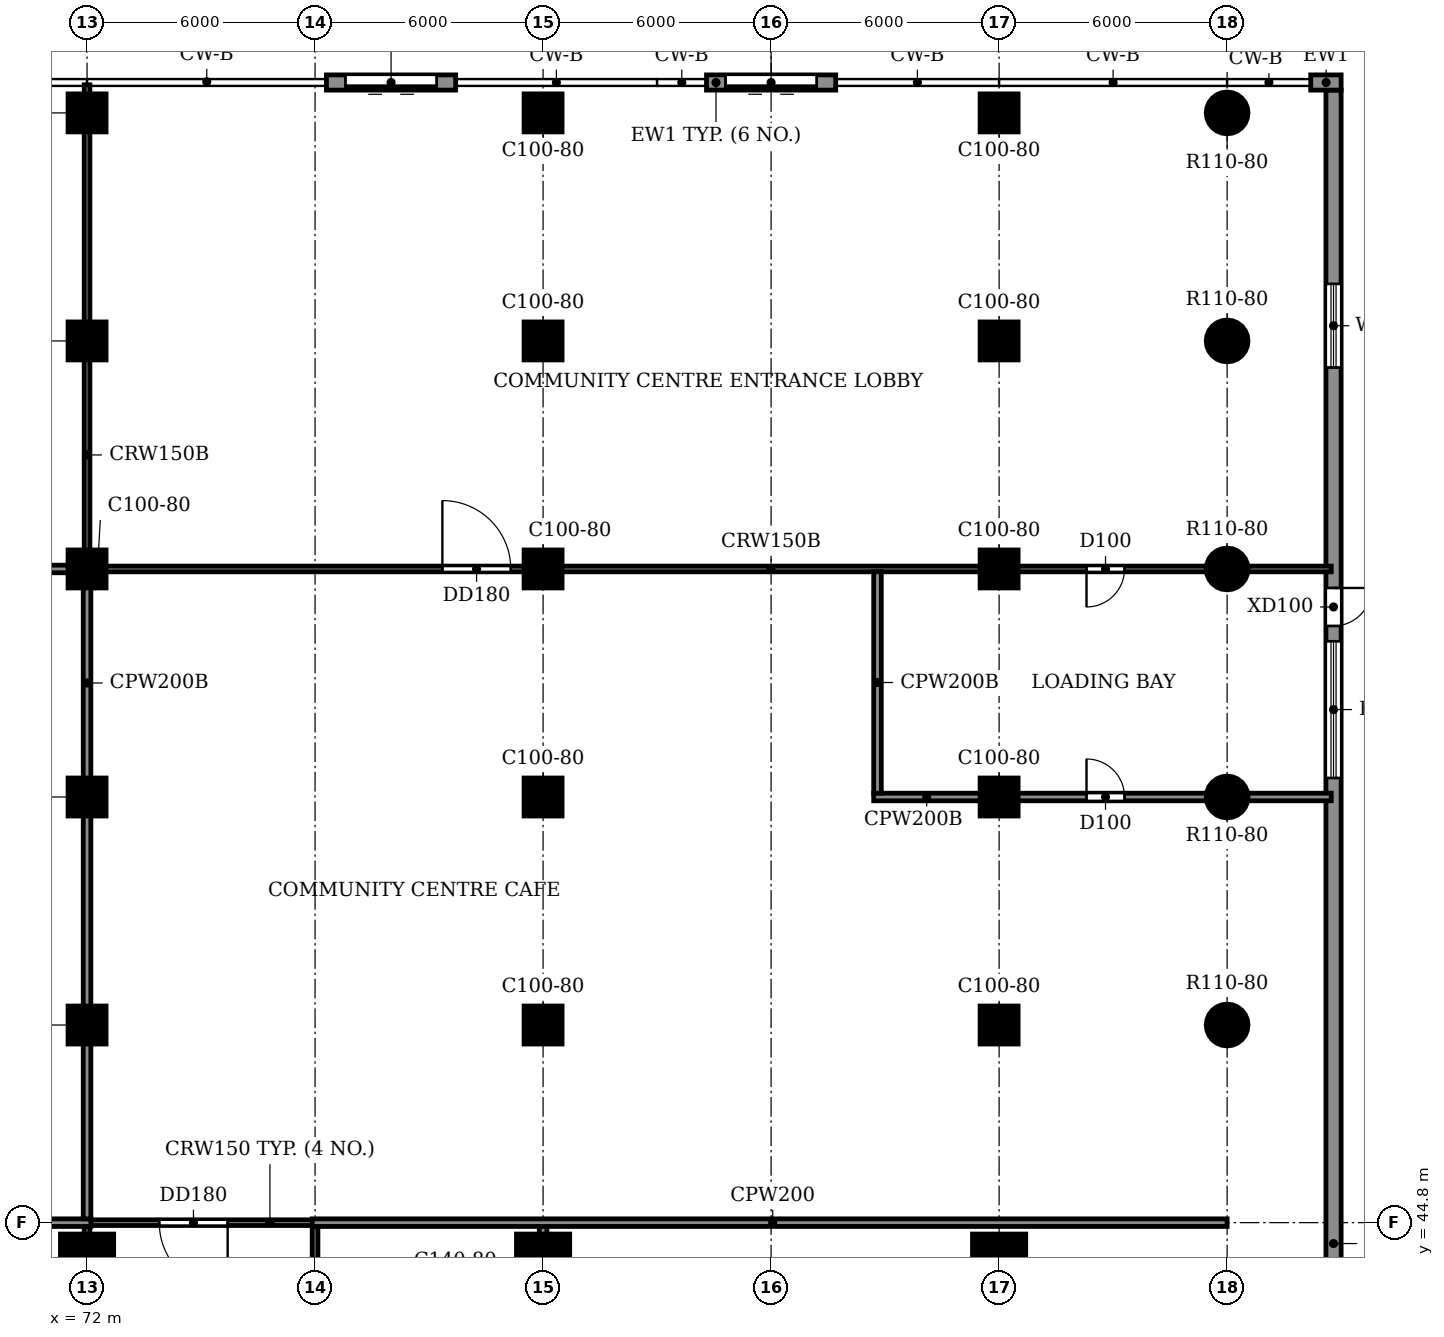
"""IFC4 building model, lengths in metres.
Left out: names, types, materials, properties, quantities, classifications, styles, units other than length and angle.
Written with IfcOpenShell. Run it as: python <this file> out.ifc"""

import sys

from ifc_helpers import new_model, si_unit, direction, frame, frame_2d, origin, origin_2d, place, context, subcontext, project, spatial, rectangle, circle, extrude, source, transform, mapped, element, fill, save


model = new_model("IFC4")
c1 = context("Model", 3, precision=1e-05, world=origin(), true_north=direction((0.0, 1.0)))
c2 = subcontext(c1, "Body", "Model", "MODEL_VIEW")
j1 = project(units=[si_unit("LENGTHUNIT", "METRE"), si_unit("PLANEANGLEUNIT", "RADIAN")], contexts=[c1])
p1 = place(None, origin())
s1 = spatial("IfcSite", under=j1, at=p1, CompositionType="ELEMENT")
p2 = place(p1, origin())
s2 = spatial("IfcBuilding", under=s1, at=p2, CompositionType="ELEMENT")
p3 = place(p2, origin())
s3 = spatial("IfcBuildingStorey", under=s2, at=p3, CompositionType="ELEMENT", Elevation=0.0)
m1 = source(origin(), c2, "Body", "SweptSolid", [
    extrude(rectangle(XDim=1.4, YDim=1.4, at=origin_2d()), origin(), (0.0, 0.0, 1.0), 4.5),
])
for number, where, z_axis, x_axis in (
    (1, (72.0, 43.8, -0.3), (0.0, 0.0, 1.0), (1.0, 0.0, 0.0)),
    (2, (84.0, 43.8, -0.3), (0.0, 0.0, 1.0), (1.0, 0.0, 0.0)),
    (3, (96.0, 43.8, -0.3), (0.0, 0.0, 1.0), (1.0, 0.0, 0.0)),
):
    element("IfcColumn", number, at=place(p3, frame(where, z_axis=z_axis, x_axis=x_axis)), inside=s3, PredefinedType="COLUMN", context=c2, shape_type="MappedRepresentation", body=[
        mapped(m1, transform((0.0, 0.0, 0.0))),
    ])
m2 = source(origin(), c2, "Body", "SweptSolid", [
    extrude(rectangle(XDim=1.0, YDim=1.0, at=origin_2d()), origin(), (0.0, 0.0, 1.0), 5.98),
])
for number, where, z_axis, x_axis in (
    (4, (72.0, 74.0, -0.3), (0.0, 0.0, 1.0), (1.0, 0.0, 0.0)),
    (5, (84.0, 74.0, -0.3), (0.0, 0.0, 1.0), (1.0, 0.0, 0.0)),
    (6, (96.0, 74.0, -0.3), (0.0, 0.0, 1.0), (1.0, 0.0, 0.0)),
):
    element("IfcColumn", number, at=place(p3, frame(where, z_axis=z_axis, x_axis=x_axis)), inside=s3, PredefinedType="COLUMN", context=c2, shape_type="MappedRepresentation", body=[
        mapped(m2, transform((0.0, 0.0, 0.0))),
    ])
m3 = source(origin(), c2, "Body", "SweptSolid", [
    extrude(circle(Radius=0.55, at=origin_2d()), origin(), (0.0, 0.0, 1.0), 5.98),
])
p4 = place(p3, frame((102.0, 74.0, -0.3), z_axis=(0.0, 0.0, 1.0), x_axis=(1.0, 0.0, 0.0)))
e7 = element("IfcColumn", 7, at=p4, inside=s3, PredefinedType="COLUMN", context=c2, shape_type="MappedRepresentation", body=[
    mapped(m3, transform((0.0, 0.0, 0.0))),
])
for number, where, z_axis, x_axis in (
    (8, (72.0, 68.0, -0.3), (0.0, 0.0, 1.0), (1.0, 0.0, 0.0)),
    (9, (84.0, 68.0, -0.3), (0.0, 0.0, 1.0), (1.0, 0.0, 0.0)),
    (10, (96.0, 68.0, -0.3), (0.0, 0.0, 1.0), (1.0, 0.0, 0.0)),
):
    element("IfcColumn", number, at=place(p3, frame(where, z_axis=z_axis, x_axis=x_axis)), inside=s3, PredefinedType="COLUMN", context=c2, shape_type="MappedRepresentation", body=[
        mapped(m2, transform((0.0, 0.0, 0.0))),
    ])
p5 = place(p3, frame((102.0, 68.0, -0.3), z_axis=(0.0, 0.0, 1.0), x_axis=(1.0, 0.0, 0.0)))
e11 = element("IfcColumn", 11, at=p5, inside=s3, PredefinedType="COLUMN", context=c2, shape_type="MappedRepresentation", body=[
    mapped(m3, transform((0.0, 0.0, 0.0))),
])
for number, where, z_axis, x_axis in (
    (12, (72.0, 62.0, -0.3), (0.0, 0.0, 1.0), (1.0, 0.0, 0.0)),
    (13, (84.0, 62.0, -0.3), (0.0, 0.0, 1.0), (1.0, 0.0, 0.0)),
    (14, (96.0, 62.0, -0.3), (0.0, 0.0, 1.0), (1.0, 0.0, 0.0)),
):
    element("IfcColumn", number, at=place(p3, frame(where, z_axis=z_axis, x_axis=x_axis)), inside=s3, PredefinedType="COLUMN", context=c2, shape_type="MappedRepresentation", body=[
        mapped(m2, transform((0.0, 0.0, 0.0))),
    ])
p6 = place(p3, frame((102.0, 62.0, -0.3), z_axis=(0.0, 0.0, 1.0), x_axis=(1.0, 0.0, 0.0)))
e15 = element("IfcColumn", 15, at=p6, inside=s3, PredefinedType="COLUMN", context=c2, shape_type="MappedRepresentation", body=[
    mapped(m3, transform((0.0, 0.0, 0.0))),
])
for number, where, z_axis, x_axis in (
    (16, (72.0, 56.0, -0.3), (0.0, 0.0, 1.0), (1.0, 0.0, 0.0)),
    (17, (84.0, 56.0, -0.3), (0.0, 0.0, 1.0), (1.0, 0.0, 0.0)),
    (18, (96.0, 56.0, -0.3), (0.0, 0.0, 1.0), (1.0, 0.0, 0.0)),
):
    element("IfcColumn", number, at=place(p3, frame(where, z_axis=z_axis, x_axis=x_axis)), inside=s3, PredefinedType="COLUMN", context=c2, shape_type="MappedRepresentation", body=[
        mapped(m2, transform((0.0, 0.0, 0.0))),
    ])
p7 = place(p3, frame((102.0, 56.0, -0.3), z_axis=(0.0, 0.0, 1.0), x_axis=(1.0, 0.0, 0.0)))
e19 = element("IfcColumn", 19, at=p7, inside=s3, PredefinedType="COLUMN", context=c2, shape_type="MappedRepresentation", body=[
    mapped(m3, transform((0.0, 0.0, 0.0))),
])
for number, where, z_axis, x_axis in (
    (20, (72.0, 50.0, -0.3), (0.0, 0.0, 1.0), (1.0, 0.0, 0.0)),
    (21, (84.0, 50.0, -0.3), (0.0, 0.0, 1.0), (1.0, 0.0, 0.0)),
    (22, (96.0, 50.0, -0.3), (0.0, 0.0, 1.0), (1.0, 0.0, 0.0)),
):
    element("IfcColumn", number, at=place(p3, frame(where, z_axis=z_axis, x_axis=x_axis)), inside=s3, PredefinedType="COLUMN", context=c2, shape_type="MappedRepresentation", body=[
        mapped(m2, transform((0.0, 0.0, 0.0))),
    ])
p8 = place(p3, frame((102.0, 50.0, -0.3), z_axis=(0.0, 0.0, 1.0), x_axis=(1.0, 0.0, 0.0)))
e23 = element("IfcColumn", 23, at=p8, inside=s3, PredefinedType="COLUMN", context=c2, shape_type="MappedRepresentation", body=[
    mapped(m3, transform((0.0, 0.0, 0.0))),
])
p9 = place(p3, frame((104.8, 0.2, 0.0), z_axis=(0.0, 0.0, 1.0), x_axis=(0.0, 1.0, 0.0)))
e24 = element("IfcWall", 24, at=p9, inside=s3, PredefinedType="STANDARD", context=c2, shape_type="SweptSolid", body=[
    extrude(rectangle(XDim=74.4, YDim=0.4, at=frame_2d((37.2, 0.0))), origin(), (0.0, 0.0, 1.0), 5.68),
])
p10 = place(p9, frame((67.1, 0.0, 0.9)))
e25 = element("IfcOpeningElement", 25, at=p10, cuts=e24, PredefinedType="OPENING", context=c2, shape_type="SweptSolid", body=[
    extrude(rectangle(XDim=2.2, YDim=2.7, at=frame_2d((1.1, 1.35))), frame((0.0, 0.21, 0.0), z_axis=(0.0, -1.0, 0.0), x_axis=(1.0, 0.0, 0.0)), (0.0, 0.0, 1.0), 0.42),
])
p11 = place(p9, frame((56.3, 0.0, 0.0)))
e26 = element("IfcOpeningElement", 26, at=p11, cuts=e24, PredefinedType="OPENING", context=c2, shape_type="SweptSolid", body=[
    extrude(rectangle(XDim=3.6, YDim=4.5, at=frame_2d((1.8, 2.25))), frame((0.0, 0.21, 0.0), z_axis=(0.0, -1.0, 0.0), x_axis=(1.0, 0.0, 0.0)), (0.0, 0.0, 1.0), 0.42),
])
p12 = place(p9, frame((60.3, 0.0, 0.0)))
e27 = element("IfcOpeningElement", 27, at=p12, cuts=e24, PredefinedType="OPENING", context=c2, shape_type="SweptSolid", body=[
    extrude(rectangle(XDim=1.0, YDim=2.1, at=frame_2d((0.5, 1.05))), frame((0.0, 0.21, 0.0), z_axis=(0.0, -1.0, 0.0), x_axis=(1.0, 0.0, 0.0)), (0.0, 0.0, 1.0), 0.42),
])
p13 = place(p9, frame((14.7, 0.0, 0.0)))
e28 = element("IfcOpeningElement", 28, at=p13, cuts=e24, PredefinedType="OPENING", context=c2, shape_type="SweptSolid", body=[
    extrude(rectangle(XDim=2.0, YDim=2.4, at=frame_2d((1.0, 1.2))), frame((0.0, 0.21, 0.0), z_axis=(0.0, -1.0, 0.0), x_axis=(1.0, 0.0, 0.0)), (0.0, 0.0, 1.0), 0.42),
])
p14 = place(p9, frame((30.4, 0.0, 0.0)))
e29 = element("IfcOpeningElement", 29, at=p14, cuts=e24, PredefinedType="OPENING", context=c2, shape_type="SweptSolid", body=[
    extrude(rectangle(XDim=2.0, YDim=2.4, at=frame_2d((1.0, 1.2))), frame((0.0, 0.21, 0.0), z_axis=(0.0, -1.0, 0.0), x_axis=(1.0, 0.0, 0.0)), (0.0, 0.0, 1.0), 0.42),
])
p15 = place(p3, frame((105.0, 74.8, 0.0), z_axis=(0.0, 0.0, 1.0), x_axis=(-1.0, 0.0, 0.0)))
e30 = element("IfcWall", 30, at=p15, inside=s3, PredefinedType="STANDARD", context=c2, shape_type="SweptSolid", body=[
    extrude(rectangle(XDim=0.8, YDim=0.4, at=frame_2d((0.4, 0.0))), origin(), (0.0, 0.0, 1.0), 5.68),
])
p16 = place(p3, frame((91.7, 74.8, 0.0), z_axis=(0.0, 0.0, 1.0), x_axis=(-1.0, 0.0, 0.0)))
e31 = element("IfcWall", 31, at=p16, inside=s3, PredefinedType="STANDARD", context=c2, shape_type="SweptSolid", body=[
    extrude(rectangle(XDim=3.4, YDim=0.4, at=frame_2d((1.7, 0.0))), origin(), (0.0, 0.0, 1.0), 5.68),
])
p17 = place(p16, frame((0.5, 0.0, 0.0)))
e32 = element("IfcOpeningElement", 32, at=p17, cuts=e31, PredefinedType="OPENING", context=c2, shape_type="SweptSolid", body=[
    extrude(rectangle(XDim=2.4, YDim=2.4, at=frame_2d((1.2, 1.2))), frame((0.0, 0.21, 0.0), z_axis=(0.0, -1.0, 0.0), x_axis=(1.0, 0.0, 0.0)), (0.0, 0.0, 1.0), 0.42),
])
p18 = place(p3, frame((81.7, 74.8, 0.0), z_axis=(0.0, 0.0, 1.0), x_axis=(-1.0, 0.0, 0.0)))
e33 = element("IfcWall", 33, at=p18, inside=s3, PredefinedType="STANDARD", context=c2, shape_type="SweptSolid", body=[
    extrude(rectangle(XDim=3.4, YDim=0.4, at=frame_2d((1.7, 0.0))), origin(), (0.0, 0.0, 1.0), 5.68),
])
p19 = place(p18, frame((0.5, 0.0, 0.0)))
e34 = element("IfcOpeningElement", 34, at=p19, cuts=e33, PredefinedType="OPENING", context=c2, shape_type="SweptSolid", body=[
    extrude(rectangle(XDim=2.4, YDim=2.4, at=frame_2d((1.2, 1.2))), frame((0.0, 0.21, 0.0), z_axis=(0.0, -1.0, 0.0), x_axis=(1.0, 0.0, 0.0)), (0.0, 0.0, 1.0), 0.42),
])
p20 = place(p3, frame((71.9, 44.8, 0.0), z_axis=(0.0, 0.0, 1.0), x_axis=(1.0, 0.0, 0.0)))
e35 = element("IfcWall", 35, at=p20, inside=s3, PredefinedType="PARTITIONING", context=c2, shape_type="SweptSolid", body=[
    extrude(rectangle(XDim=6.175, YDim=0.15, at=frame_2d((3.087, 0.0))), origin(), (0.0, 0.0, 1.0), 4.2),
])
p21 = place(p20, frame((2.0, 0.0, 0.0)))
e36 = element("IfcOpeningElement", 36, at=p21, cuts=e35, PredefinedType="OPENING", context=c2, shape_type="SweptSolid", body=[
    extrude(rectangle(XDim=1.8, YDim=2.1, at=frame_2d((0.9, 1.05))), frame((0.0, 0.085, 0.0), z_axis=(0.0, -1.0, 0.0), x_axis=(1.0, 0.0, 0.0)), (0.0, 0.0, 1.0), 0.17),
])
p22 = place(p3, frame((71.9, 62.0, 0.0), z_axis=(0.0, 0.0, 1.0), x_axis=(1.0, 0.0, 0.0)))
e37 = element("IfcWall", 37, at=p22, inside=s3, PredefinedType="PARTITIONING", context=c2, shape_type="SweptSolid", body=[
    extrude(rectangle(XDim=32.84, YDim=0.15, at=frame_2d((16.42, 0.0))), origin(), (0.0, 0.0, 1.0), 5.68),
])
p23 = place(p22, frame((9.45, 0.0, 0.0)))
e38 = element("IfcOpeningElement", 38, at=p23, cuts=e37, PredefinedType="OPENING", context=c2, shape_type="SweptSolid", body=[
    extrude(rectangle(XDim=1.8, YDim=2.1, at=frame_2d((0.9, 1.05))), frame((0.0, 0.085, 0.0), z_axis=(0.0, -1.0, 0.0), x_axis=(1.0, 0.0, 0.0)), (0.0, 0.0, 1.0), 0.17),
])
p24 = place(p22, frame((26.4, 0.0, 0.0)))
e39 = element("IfcOpeningElement", 39, at=p24, cuts=e37, PredefinedType="OPENING", context=c2, shape_type="SweptSolid", body=[
    extrude(rectangle(XDim=1.0, YDim=2.1, at=frame_2d((0.5, 1.05))), frame((0.0, 0.085, 0.0), z_axis=(0.0, -1.0, 0.0), x_axis=(1.0, 0.0, 0.0)), (0.0, 0.0, 1.0), 0.17),
])
p25 = place(p3, frame((72.0, 30.475, 0.0), z_axis=(0.0, 0.0, 1.0), x_axis=(0.0, 1.0, 0.0)))
e40 = element("IfcWall", 40, at=p25, inside=s3, PredefinedType="PARTITIONING", context=c2, shape_type="SweptSolid", body=[
    extrude(rectangle(XDim=14.225, YDim=0.15, at=frame_2d((7.112, 0.0))), origin(), (0.0, 0.0, 1.0), 4.2),
])
p26 = place(p25, frame((6.225, 0.0, 0.0)))
e41 = element("IfcOpeningElement", 41, at=p26, cuts=e40, PredefinedType="OPENING", context=c2, shape_type="SweptSolid", body=[
    extrude(rectangle(XDim=1.8, YDim=2.1, at=frame_2d((0.9, 1.05))), frame((0.0, 0.085, 0.0), z_axis=(0.0, -1.0, 0.0), x_axis=(1.0, 0.0, 0.0)), (0.0, 0.0, 1.0), 0.17),
])
p27 = place(p3, frame((72.0, 62.1, 0.0), z_axis=(0.0, 0.0, 1.0), x_axis=(0.0, 1.0, 0.0)))
e42 = element("IfcWall", 42, at=p27, inside=s3, PredefinedType="PARTITIONING", context=c2, shape_type="SweptSolid", body=[
    extrude(rectangle(XDim=12.64, YDim=0.15, at=frame_2d((6.32, 0.0))), origin(), (0.0, 0.0, 1.0), 5.68),
])
p28 = place(p3, frame((78.0, 38.535, 0.0), z_axis=(0.0, 0.0, 1.0), x_axis=(0.0, 1.0, 0.0)))
e43 = element("IfcWall", 43, at=p28, inside=s3, PredefinedType="PARTITIONING", context=c2, shape_type="SweptSolid", body=[
    extrude(rectangle(XDim=6.165, YDim=0.15, at=frame_2d((3.083, 0.0))), origin(), (0.0, 0.0, 1.0), 4.2),
])
p29 = place(p28, frame((2.615, 0.0, 0.0)))
e44 = element("IfcOpeningElement", 44, at=p29, cuts=e43, PredefinedType="OPENING", context=c2, shape_type="SweptSolid", body=[
    extrude(rectangle(XDim=0.9, YDim=2.1, at=frame_2d((0.45, 1.05))), frame((0.0, 0.085, 0.0), z_axis=(0.0, -1.0, 0.0), x_axis=(1.0, 0.0, 0.0)), (0.0, 0.0, 1.0), 0.17),
])
p30 = place(p3, frame((53.925, 44.8, 0.0), z_axis=(0.0, 0.0, 1.0), x_axis=(1.0, 0.0, 0.0)))
e45 = element("IfcWall", 45, at=p30, inside=s3, PredefinedType="PARTITIONING", context=c2, shape_type="SweptSolid", body=[
    extrude(rectangle(XDim=18.175, YDim=0.2, at=frame_2d((9.087, 0.0))), origin(), (0.0, 0.0, 1.0), 4.2),
])
p31 = place(p3, frame((77.925, 44.8, 0.0), z_axis=(0.0, 0.0, 1.0), x_axis=(1.0, 0.0, 0.0)))
e46 = element("IfcWall", 46, at=p31, inside=s3, PredefinedType="PARTITIONING", context=c2, shape_type="SweptSolid", body=[
    extrude(rectangle(XDim=24.075, YDim=0.2, at=frame_2d((12.038, 0.0))), origin(), (0.0, 0.0, 1.0), 4.2),
])
p32 = place(p3, frame((92.7, 56.0, 0.0), z_axis=(0.0, 0.0, 1.0), x_axis=(1.0, 0.0, 0.0)))
e47 = element("IfcWall", 47, at=p32, inside=s3, PredefinedType="PARTITIONING", context=c2, shape_type="SweptSolid", body=[
    extrude(rectangle(XDim=12.04, YDim=0.2, at=frame_2d((6.02, 0.0))), origin(), (0.0, 0.0, 1.0), 5.68),
])
p33 = place(p32, frame((5.6, 0.0, 0.0)))
e48 = element("IfcOpeningElement", 48, at=p33, cuts=e47, PredefinedType="OPENING", context=c2, shape_type="SweptSolid", body=[
    extrude(rectangle(XDim=1.0, YDim=2.1, at=frame_2d((0.5, 1.05))), frame((0.0, 0.11, 0.0), z_axis=(0.0, -1.0, 0.0), x_axis=(1.0, 0.0, 0.0)), (0.0, 0.0, 1.0), 0.22),
])
p34 = place(p3, frame((48.075, 62.0, 0.0), z_axis=(0.0, 0.0, 1.0), x_axis=(1.0, 0.0, 0.0)))
e49 = element("IfcWall", 49, at=p34, inside=s3, PredefinedType="PARTITIONING", context=c2, shape_type="SweptSolid", body=[
    extrude(rectangle(XDim=24.025, YDim=0.2, at=frame_2d((12.013, 0.0))), origin(), (0.0, 0.0, 1.0), 5.68),
])
p35 = place(p3, frame((72.0, 44.9, 0.0), z_axis=(0.0, 0.0, 1.0), x_axis=(0.0, 1.0, 0.0)))
e50 = element("IfcWall", 50, at=p35, inside=s3, PredefinedType="PARTITIONING", context=c2, shape_type="SweptSolid", body=[
    extrude(rectangle(XDim=17.0, YDim=0.2, at=frame_2d((8.5, 0.0))), origin(), (0.0, 0.0, 1.0), 5.68),
])
p36 = place(p3, frame((84.0, 32.875, 0.0), z_axis=(0.0, 0.0, 1.0), x_axis=(0.0, 1.0, 0.0)))
e51 = element("IfcWall", 51, at=p36, inside=s3, PredefinedType="PARTITIONING", context=c2, shape_type="SweptSolid", body=[
    extrude(rectangle(XDim=11.825, YDim=0.2, at=frame_2d((5.913, 0.0))), origin(), (0.0, 0.0, 1.0), 4.2),
])
p37 = place(p3, frame((92.8, 56.1, 0.0), z_axis=(0.0, 0.0, 1.0), x_axis=(0.0, 1.0, 0.0)))
e52 = element("IfcWall", 52, at=p37, inside=s3, PredefinedType="PARTITIONING", context=c2, shape_type="SweptSolid", body=[
    extrude(rectangle(XDim=5.825, YDim=0.2, at=frame_2d((2.913, 0.0))), origin(), (0.0, 0.0, 1.0), 5.68),
])
p38 = place(p10, origin())
e53 = element("IfcWindow", 53, at=p38, inside=s3, PartitioningType="DOUBLE_PANEL_HORIZONTAL", PredefinedType="WINDOW", context=c2, shape_type="SweptSolid", body=[
    extrude(rectangle(XDim=2.2, YDim=2.7, at=frame_2d((1.1, 1.35))), frame((0.0, 0.03, 0.0), z_axis=(0.0, -1.0, 0.0), x_axis=(1.0, 0.0, 0.0)), (0.0, 0.0, 1.0), 0.06),
])
fill(e25, e53)
p39 = place(p19, origin())
e54 = element("IfcDoor", 54, at=p39, inside=s3, OperationType="DOUBLE_DOOR_SLIDING", PredefinedType="DOOR", context=c2, shape_type="SweptSolid", body=[
    extrude(rectangle(XDim=2.4, YDim=2.4, at=frame_2d((1.2, 1.2))), frame((0.0, 0.025, 0.0), z_axis=(0.0, -1.0, 0.0), x_axis=(1.0, 0.0, 0.0)), (0.0, 0.0, 1.0), 0.05),
])
fill(e34, e54)
p40 = place(p23, origin())
e55 = element("IfcDoor", 55, at=p40, inside=s3, OperationType="DOUBLE_DOOR_SINGLE_SWING", PredefinedType="DOOR", context=c2, shape_type="SweptSolid", body=[
    extrude(rectangle(XDim=1.8, YDim=2.1, at=frame_2d((0.9, 1.05))), frame((0.0, 0.025, 0.0), z_axis=(0.0, -1.0, 0.0), x_axis=(1.0, 0.0, 0.0)), (0.0, 0.0, 1.0), 0.05),
])
fill(e38, e55)
p41 = place(p17, origin())
e56 = element("IfcDoor", 56, at=p41, inside=s3, OperationType="DOUBLE_DOOR_SLIDING", PredefinedType="DOOR", context=c2, shape_type="SweptSolid", body=[
    extrude(rectangle(XDim=2.4, YDim=2.4, at=frame_2d((1.2, 1.2))), frame((0.0, 0.025, 0.0), z_axis=(0.0, -1.0, 0.0), x_axis=(1.0, 0.0, 0.0)), (0.0, 0.0, 1.0), 0.05),
])
fill(e32, e56)
p42 = place(p21, frame((1.8, 0.0, 0.0), z_axis=(0.0, 0.0, 1.0), x_axis=(-1.0, 0.0, 0.0)))
e57 = element("IfcDoor", 57, at=p42, inside=s3, OperationType="DOUBLE_DOOR_SINGLE_SWING", PredefinedType="DOOR", context=c2, shape_type="SweptSolid", body=[
    extrude(rectangle(XDim=1.8, YDim=2.1, at=frame_2d((0.9, 1.05))), frame((0.0, 0.025, 0.0), z_axis=(0.0, -1.0, 0.0), x_axis=(1.0, 0.0, 0.0)), (0.0, 0.0, 1.0), 0.05),
])
fill(e36, e57)
p43 = place(p33, origin())
e58 = element("IfcDoor", 58, at=p43, inside=s3, OperationType="SINGLE_SWING_LEFT", PredefinedType="DOOR", context=c2, shape_type="SweptSolid", body=[
    extrude(rectangle(XDim=1.0, YDim=2.1, at=frame_2d((0.5, 1.05))), frame((0.0, 0.025, 0.0), z_axis=(0.0, -1.0, 0.0), x_axis=(1.0, 0.0, 0.0)), (0.0, 0.0, 1.0), 0.05),
])
fill(e48, e58)
p44 = place(p24, frame((1.0, 0.0, 0.0), z_axis=(0.0, 0.0, 1.0), x_axis=(-1.0, 0.0, 0.0)))
e59 = element("IfcDoor", 59, at=p44, inside=s3, OperationType="SINGLE_SWING_RIGHT", PredefinedType="DOOR", context=c2, shape_type="SweptSolid", body=[
    extrude(rectangle(XDim=1.0, YDim=2.1, at=frame_2d((0.5, 1.05))), frame((0.0, 0.025, 0.0), z_axis=(0.0, -1.0, 0.0), x_axis=(1.0, 0.0, 0.0)), (0.0, 0.0, 1.0), 0.05),
])
fill(e39, e59)
p45 = place(p11, origin())
e60 = element("IfcDoor", 60, at=p45, inside=s3, OperationType="ROLLINGUP", PredefinedType="DOOR", context=c2, shape_type="SweptSolid", body=[
    extrude(rectangle(XDim=3.6, YDim=4.5, at=frame_2d((1.8, 2.25))), frame((0.0, 0.025, 0.0), z_axis=(0.0, -1.0, 0.0), x_axis=(1.0, 0.0, 0.0)), (0.0, 0.0, 1.0), 0.05),
])
fill(e26, e60)
p46 = place(p12, frame((1.0, 0.0, 0.0), z_axis=(0.0, 0.0, 1.0), x_axis=(-1.0, 0.0, 0.0)))
e61 = element("IfcDoor", 61, at=p46, inside=s3, OperationType="SINGLE_SWING_LEFT", PredefinedType="DOOR", context=c2, shape_type="SweptSolid", body=[
    extrude(rectangle(XDim=1.0, YDim=2.1, at=frame_2d((0.5, 1.05))), frame((0.0, 0.025, 0.0), z_axis=(0.0, -1.0, 0.0), x_axis=(1.0, 0.0, 0.0)), (0.0, 0.0, 1.0), 0.05),
])
fill(e27, e61)
save(model, sys.argv[1])
